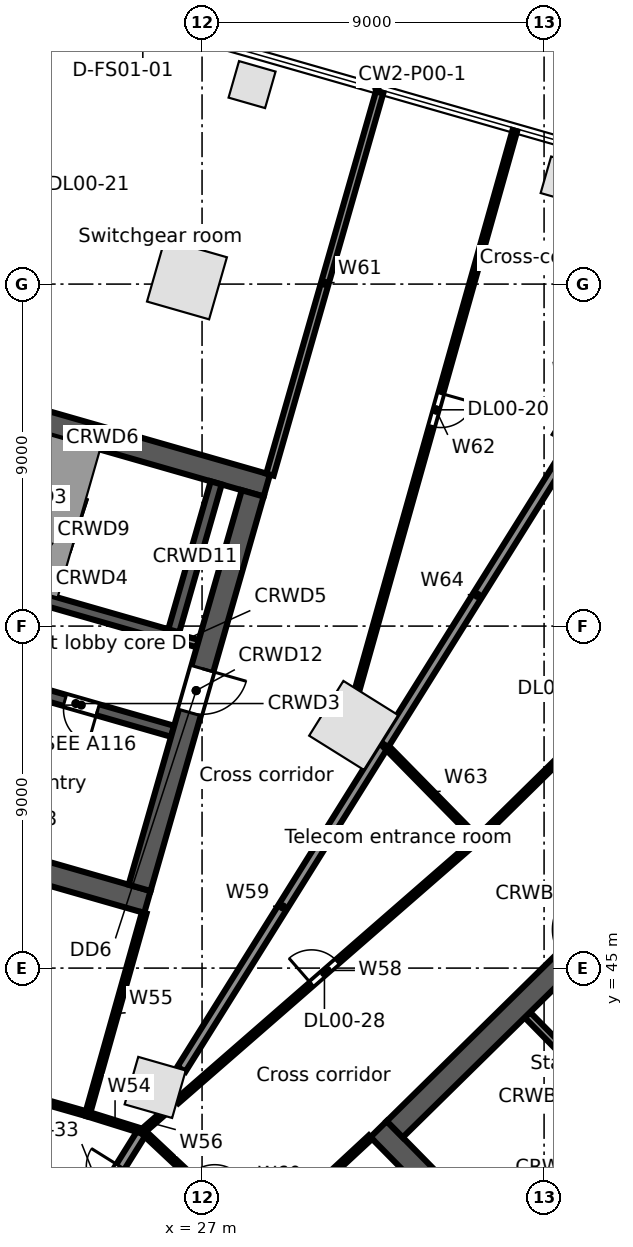
"""IFC4 building model, lengths in metres.
Left out: names, types, materials, properties, quantities, classifications, styles, units other than length and angle.
Written with IfcOpenShell. Run it as: python <this file> out.ifc"""

import sys

from ifc_helpers import new_model, si_unit, direction, frame, frame_2d, origin, origin_2d, place, context, subcontext, project, spatial, rectangle, extrude, element, fill, save


model = new_model("IFC4")
c1 = context("Model", 3, precision=1e-05, world=origin(), true_north=direction((0.0, 1.0)))
c2 = subcontext(c1, "Body", "Model", "MODEL_VIEW")
j1 = project(units=[si_unit("LENGTHUNIT", "METRE"), si_unit("PLANEANGLEUNIT", "RADIAN")], contexts=[c1])
p1 = place(None, origin())
s1 = spatial("IfcSite", under=j1, at=p1, CompositionType="ELEMENT")
p2 = place(p1, origin())
s2 = spatial("IfcBuilding", under=s1, at=p2, CompositionType="ELEMENT")
p3 = place(p2, origin())
s3 = spatial("IfcBuildingStorey", under=s2, at=p3, CompositionType="ELEMENT", Elevation=0.0)
p4 = place(p3, frame((37.085, 59.262, 0.0), z_axis=(0.0, 0.0, 1.0), x_axis=(-0.859406411501, 0.511293086077, 0.0)))
e1 = element("IfcColumn", 1, at=p4, inside=s3, PredefinedType="COLUMN", context=c2, shape_type="SweptSolid", body=[
    extrude(rectangle(XDim=1.3, YDim=1.3, at=origin_2d()), origin(), (0.0, 0.0, 1.0), 6.5),
])
p5 = place(p3, frame((26.603, 63.124, 0.0), z_axis=(0.0, 0.0, 1.0), x_axis=(-0.961261695938, 0.275637355817, 0.0)))
e2 = element("IfcColumn", 2, at=p5, inside=s3, PredefinedType="COLUMN", context=c2, shape_type="SweptSolid", body=[
    extrude(rectangle(XDim=1.7, YDim=1.7, at=origin_2d()), origin(), (0.0, 0.0, 1.0), 6.5),
])
p6 = place(p3, frame((25.767, 41.86, 0.0), z_axis=(0.0, 0.0, 1.0), x_axis=(0.961261695938, -0.275637355817, 0.0)))
e3 = element("IfcColumn", 3, at=p6, inside=s3, PredefinedType="COLUMN", context=c2, shape_type="SweptSolid", body=[
    extrude(rectangle(XDim=1.3, YDim=1.3, at=origin_2d()), origin(), (0.0, 0.0, 1.0), 6.5),
])
p7 = place(p3, frame((30.99, 51.386, 0.0), z_axis=(0.0, 0.0, 1.0), x_axis=(0.529919264233, 0.848048096156, 0.0)))
e4 = element("IfcColumn", 4, at=p7, inside=s3, PredefinedType="COLUMN", context=c2, shape_type="SweptSolid", body=[
    extrude(rectangle(XDim=1.7, YDim=1.7, at=origin_2d()), origin(), (0.0, 0.0, 1.0), 6.5),
])
for number, where, z_axis, x_axis in (
    (5, (36.528, 65.739, 0.0), (0.0, 0.0, 1.0), (-0.961, 0.276, 0.0)),
    (6, (28.316, 68.25, 0.0), (0.0, 0.0, 1.0), (-0.961, 0.276, 0.0)),
):
    element("IfcColumn", number, at=place(p3, frame(where, z_axis=z_axis, x_axis=x_axis)), inside=s3, PredefinedType="COLUMN", context=c2, shape_type="SweptSolid", body=[
        extrude(rectangle(XDim=1.0, YDim=1.0, at=origin_2d()), origin(), (0.0, 0.0, 1.0), 6.5),
    ])
p8 = place(p3, frame((31.646, 40.763, 0.0), z_axis=(0.0, 0.0, 1.0), x_axis=(0.700911255944, -0.713248491965, 0.0)))
e7 = element("IfcWall", 7, at=p8, inside=s3, PredefinedType="SOLIDWALL", context=c2, shape_type="SweptSolid", body=[
    extrude(rectangle(XDim=15.0, YDim=0.6, at=frame_2d((7.5, 0.0))), origin(), (0.0, 0.0, 1.0), 6.15),
])
p9 = place(p8, frame((12.9, 0.0, 0.0)))
e8 = element("IfcOpeningElement", 8, at=p9, cuts=e7, PredefinedType="OPENING", context=c2, shape_type="SweptSolid", body=[
    extrude(rectangle(XDim=1.2, YDim=2.1, at=frame_2d((0.6, 1.05))), frame((0.0, 0.31, 0.0), z_axis=(0.0, -1.0, 0.0), x_axis=(1.0, 0.0, 0.0)), (0.0, 0.0, 1.0), 0.62),
])
p10 = place(p3, frame((35.561, 43.769, 0.0), z_axis=(0.0, 0.0, 1.0), x_axis=(0.70090232736, -0.713257266, 0.0)))
e9 = element("IfcWall", 9, at=p10, inside=s3, PredefinedType="SOLIDWALL", context=c2, shape_type="SweptSolid", body=[
    extrude(rectangle(XDim=3.3, YDim=0.2, at=frame_2d((1.65, 0.0))), origin(), (0.0, 0.0, 1.0), 6.15),
])
p11 = place(p3, frame((32.07, 40.759, 0.0), z_axis=(0.0, 0.0, 1.0), x_axis=(0.713245344712, 0.70091445858, 0.0)))
e10 = element("IfcWall", 10, at=p11, inside=s3, PredefinedType="SOLIDWALL", context=c2, shape_type="SweptSolid", body=[
    extrude(rectangle(XDim=13.8, YDim=0.6, at=frame_2d((6.9, 0.0))), origin(), (0.0, 0.0, 1.0), 6.15),
])
p12 = place(p11, frame((6.3, 0.0, 0.0)))
e11 = element("IfcOpeningElement", 11, at=p12, cuts=e10, PredefinedType="OPENING", context=c2, shape_type="SweptSolid", body=[
    extrude(rectangle(XDim=1.2, YDim=2.1, at=frame_2d((0.6, 1.05))), frame((0.0, 0.31, 0.0), z_axis=(0.0, -1.0, 0.0), x_axis=(1.0, 0.0, 0.0)), (0.0, 0.0, 1.0), 0.62),
])
p13 = place(p3, frame((34.593, 38.191, 0.0), z_axis=(0.0, 0.0, 1.0), x_axis=(0.713252216116, 0.700907466222, 0.0)))
e12 = element("IfcWall", 12, at=p13, inside=s3, PredefinedType="SOLIDWALL", context=c2, shape_type="SweptSolid", body=[
    extrude(rectangle(XDim=4.45, YDim=0.2, at=frame_2d((2.225, 0.0))), origin(), (0.0, 0.0, 1.0), 6.15),
])
p14 = place(p3, frame((16.911, 49.221, 0.0), z_axis=(0.0, 0.0, 1.0), x_axis=(0.96126248289, -0.275634611374, 0.0)))
e13 = element("IfcWall", 13, at=p14, inside=s3, PredefinedType="SOLIDWALL", context=c2, shape_type="SweptSolid", body=[
    extrude(rectangle(XDim=9.0, YDim=0.6, at=frame_2d((4.5, 0.0))), origin(), (0.0, 0.0, 1.0), 6.15),
])
p15 = place(p3, frame((21.131, 52.692, 0.0), z_axis=(0.0, 0.0, 1.0), x_axis=(0.961271492568, -0.275603188616, 0.0)))
e14 = element("IfcWall", 14, at=p15, inside=s3, PredefinedType="SOLIDWALL", context=c2, shape_type="SweptSolid", body=[
    extrude(rectangle(XDim=5.3, YDim=0.3, at=frame_2d((2.65, 0.0))), origin(), (0.0, 0.0, 1.0), 6.15),
])
p16 = place(p15, frame((2.35, 0.0, 0.0)))
e15 = element("IfcOpeningElement", 15, at=p16, cuts=e14, PredefinedType="OPENING", context=c2, shape_type="SweptSolid", body=[
    extrude(rectangle(XDim=0.9, YDim=2.1, at=frame_2d((0.45, 1.05))), frame((0.0, 0.16, 0.0), z_axis=(0.0, -1.0, 0.0), x_axis=(1.0, 0.0, 0.0)), (0.0, 0.0, 1.0), 0.32),
])
p17 = place(p3, frame((19.389, 55.689, 0.0), z_axis=(0.0, 0.0, 1.0), x_axis=(0.961261397636, -0.275638396117, 0.0)))
e16 = element("IfcWall", 16, at=p17, inside=s3, PredefinedType="SOLIDWALL", context=c2, shape_type="SweptSolid", body=[
    extrude(rectangle(XDim=7.1, YDim=0.3, at=frame_2d((3.55, 0.0))), origin(), (0.0, 0.0, 1.0), 6.15),
])
p18 = place(p17, frame((0.2, 0.0, 0.0)))
e17 = element("IfcOpeningElement", 17, at=p18, cuts=e16, PredefinedType="OPENING", context=c2, shape_type="SweptSolid", body=[
    extrude(rectangle(XDim=1.0, YDim=2.1, at=frame_2d((0.5, 1.05))), frame((0.0, 0.16, 0.0), z_axis=(0.0, -1.0, 0.0), x_axis=(1.0, 0.0, 0.0)), (0.0, 0.0, 1.0), 0.32),
])
p19 = place(p3, frame((26.214, 53.732, 0.0), z_axis=(0.0, 0.0, 1.0), x_axis=(0.96122076476, -0.27578005982, 0.0)))
e18 = element("IfcWall", 18, at=p19, inside=s3, PredefinedType="SOLIDWALL", context=c2, shape_type="SweptSolid", body=[
    extrude(rectangle(XDim=0.7, YDim=0.2, at=frame_2d((0.35, 0.0))), origin(), (0.0, 0.0, 1.0), 6.15),
])
p20 = place(p3, frame((20.053, 60.18, 0.0), z_axis=(0.0, 0.0, 1.0), x_axis=(0.96126248289, -0.275634611374, 0.0)))
e19 = element("IfcWall", 19, at=p20, inside=s3, PredefinedType="SOLIDWALL", context=c2, shape_type="SweptSolid", body=[
    extrude(rectangle(XDim=9.0, YDim=0.6, at=frame_2d((4.5, 0.0))), origin(), (0.0, 0.0, 1.0), 6.15),
])
p21 = place(p3, frame((26.256, 53.876, 0.0), z_axis=(0.0, 0.0, 1.0), x_axis=(0.275612739511, 0.961268754209, 0.0)))
e20 = element("IfcWall", 20, at=p21, inside=s3, PredefinedType="SOLIDWALL", context=c2, shape_type="SweptSolid", body=[
    extrude(rectangle(XDim=4.05, YDim=0.3, at=frame_2d((2.025, 0.0))), origin(), (0.0, 0.0, 1.0), 6.15),
])
p22 = place(p3, frame((25.356, 47.112, 0.0), z_axis=(0.0, 0.0, 1.0), x_axis=(0.275631631629, 0.961263337304, 0.0)))
e21 = element("IfcWall", 21, at=p22, inside=s3, PredefinedType="SOLIDWALL", context=c2, shape_type="SweptSolid", body=[
    extrude(rectangle(XDim=10.8, YDim=0.6, at=frame_2d((5.4, 0.0))), origin(), (0.0, 0.0, 1.0), 6.15),
])
p23 = place(p22, frame((4.8, 0.0, 0.0)))
e22 = element("IfcOpeningElement", 22, at=p23, cuts=e21, PredefinedType="OPENING", context=c2, shape_type="SweptSolid", body=[
    extrude(rectangle(XDim=1.2, YDim=2.1, at=frame_2d((0.6, 1.05))), frame((0.0, 0.31, 0.0), z_axis=(0.0, -1.0, 0.0), x_axis=(1.0, 0.0, 0.0)), (0.0, 0.0, 1.0), 0.62),
])
p24 = place(p3, frame((15.335, 43.639, 0.0), z_axis=(0.0, 0.0, 1.0), x_axis=(0.961281982754, -0.275566597455, 0.0)))
e23 = element("IfcWall", 23, at=p24, inside=s3, PredefinedType="PARTITIONING", context=c2, shape_type="SweptSolid", body=[
    extrude(rectangle(XDim=9.0, YDim=0.125, at=frame_2d((4.5, 0.0))), origin(), (0.0, 0.0, 1.0), 5.322),
])
p25 = place(p24, frame((3.95, 0.0, 0.0)))
e24 = element("IfcOpeningElement", 24, at=p25, cuts=e23, PredefinedType="OPENING", context=c2, shape_type="SweptSolid", body=[
    extrude(rectangle(XDim=0.9, YDim=2.1, at=frame_2d((0.45, 1.05))), frame((0.0, 0.073, 0.0), z_axis=(0.0, -1.0, 0.0), x_axis=(1.0, 0.0, 0.0)), (0.0, 0.0, 1.0), 0.145),
])
p26 = place(p3, frame((20.136, 60.468, 0.0), z_axis=(0.0, 0.0, 1.0), x_axis=(0.275610651454, 0.96126935289, 0.0)))
e25 = element("IfcWall", 25, at=p26, inside=s3, PredefinedType="PARTITIONING", context=c2, shape_type="SweptSolid", body=[
    extrude(rectangle(XDim=10.475, YDim=0.2, at=frame_2d((5.237, 0.0))), origin(), (0.0, 0.0, 1.0), 5.43),
])
p27 = place(p26, frame((4.45, 0.0, 0.0)))
e26 = element("IfcOpeningElement", 26, at=p27, cuts=e25, PredefinedType="OPENING", context=c2, shape_type="SweptSolid", body=[
    extrude(rectangle(XDim=1.8, YDim=2.1, at=frame_2d((0.9, 1.05))), frame((0.0, 0.11, 0.0), z_axis=(0.0, -1.0, 0.0), x_axis=(1.0, 0.0, 0.0)), (0.0, 0.0, 1.0), 0.22),
])
p28 = place(p3, frame((23.397, 37.442, 0.0), z_axis=(0.0, 0.0, 1.0), x_axis=(0.529805058875, 0.848119448893, 0.0)))
e27 = element("IfcWall", 27, at=p28, inside=s3, PredefinedType="PARTITIONING", context=c2, shape_type="SweptSolid", body=[
    extrude(rectangle(XDim=3.849, YDim=0.25, at=frame_2d((1.924, 0.0))), origin(), (0.0, 0.0, 1.0), 5.212),
])
p29 = place(p28, frame((0.95, 0.0, 0.0)))
e28 = element("IfcOpeningElement", 28, at=p29, cuts=e27, PredefinedType="OPENING", context=c2, shape_type="SweptSolid", body=[
    extrude(rectangle(XDim=1.8, YDim=2.1, at=frame_2d((0.9, 1.05))), frame((0.0, 0.135, 0.0), z_axis=(0.0, -1.0, 0.0), x_axis=(1.0, 0.0, 0.0)), (0.0, 0.0, 1.0), 0.27),
])
p30 = place(p3, frame((23.986, 41.159, 0.0), z_axis=(0.0, 0.0, 1.0), x_axis=(0.954522865266, -0.298137719325, 0.0)))
e29 = element("IfcWall", 29, at=p30, inside=s3, PredefinedType="PARTITIONING", context=c2, shape_type="SweptSolid", body=[
    extrude(rectangle(XDim=1.519, YDim=0.125, at=frame_2d((0.76, 0.0))), origin(), (0.0, 0.0, 1.0), 5.212),
])
p31 = place(p3, frame((23.986, 41.159, 0.0), z_axis=(0.0, 0.0, 1.0), x_axis=(0.271465437068, 0.962448188983, 0.0)))
e30 = element("IfcWall", 30, at=p31, inside=s3, PredefinedType="PARTITIONING", context=c2, shape_type="SweptSolid", body=[
    extrude(rectangle(XDim=5.5, YDim=0.125, at=frame_2d((2.75, 0.0))), origin(), (0.0, 0.0, 1.0), 5.43),
])
p32 = place(p3, frame((25.436, 40.706, 0.0), z_axis=(0.0, 0.0, 1.0), x_axis=(0.753521944961, 0.657422754749, 0.0)))
e31 = element("IfcWall", 31, at=p32, inside=s3, PredefinedType="PARTITIONING", context=c2, shape_type="SweptSolid", body=[
    extrude(rectangle(XDim=0.656, YDim=0.125, at=frame_2d((0.328, 0.0))), origin(), (0.0, 0.0, 1.0), 6.15),
])
p33 = place(p3, frame((25.436, 40.706, 0.0), z_axis=(0.0, 0.0, 1.0), x_axis=(0.729011488135, -0.684501461041, 0.0)))
e32 = element("IfcWall", 32, at=p33, inside=s3, PredefinedType="PARTITIONING", context=c2, shape_type="SweptSolid", body=[
    extrude(rectangle(XDim=4.202, YDim=0.125, at=frame_2d((2.101, 0.0))), origin(), (0.0, 0.0, 1.0), 6.15),
])
p34 = place(p33, frame((1.7, 0.0, 0.0)))
e33 = element("IfcOpeningElement", 33, at=p34, cuts=e32, PredefinedType="OPENING", context=c2, shape_type="SweptSolid", body=[
    extrude(rectangle(XDim=0.9, YDim=2.1, at=frame_2d((0.45, 1.05))), frame((0.0, 0.073, 0.0), z_axis=(0.0, -1.0, 0.0), x_axis=(1.0, 0.0, 0.0)), (0.0, 0.0, 1.0), 0.145),
])
p35 = place(p3, frame((26.338, 41.492, 0.0), z_axis=(0.0, 0.0, 1.0), x_axis=(0.753866696092, 0.657027400131, 0.0)))
e34 = element("IfcWall", 34, at=p35, inside=s3, PredefinedType="PARTITIONING", context=c2, shape_type="SweptSolid", body=[
    extrude(rectangle(XDim=10.493, YDim=0.125, at=frame_2d((5.246, 0.0))), origin(), (0.0, 0.0, 1.0), 5.23),
])
p36 = place(p35, frame((4.7, 0.0, 0.0)))
e35 = element("IfcOpeningElement", 35, at=p36, cuts=e34, PredefinedType="OPENING", context=c2, shape_type="SweptSolid", body=[
    extrude(rectangle(XDim=0.9, YDim=2.1, at=frame_2d((0.45, 1.05))), frame((0.0, 0.073, 0.0), z_axis=(0.0, -1.0, 0.0), x_axis=(1.0, 0.0, 0.0)), (0.0, 0.0, 1.0), 0.145),
])
p37 = place(p3, frame((26.456, 42.338, 0.0), z_axis=(0.0, 0.0, 1.0), x_axis=(0.529866075757, 0.848081329686, 0.0)))
e36 = element("IfcWall", 36, at=p37, inside=s3, PredefinedType="PARTITIONING", context=c2, shape_type="SweptSolid", body=[
    extrude(rectangle(XDim=10.076, YDim=0.25, at=frame_2d((5.038, 0.0))), origin(), (0.0, 0.0, 1.0), 5.212),
])
p38 = place(p3, frame((28.499, 37.83, 0.0), z_axis=(0.0, 0.0, 1.0), x_axis=(0.732973836409, 0.680256830278, 0.0)))
e37 = element("IfcWall", 37, at=p38, inside=s3, PredefinedType="PARTITIONING", context=c2, shape_type="SweptSolid", body=[
    extrude(rectangle(XDim=4.001, YDim=0.125, at=frame_2d((2.0, 0.0))), origin(), (0.0, 0.0, 1.0), 5.43),
])
p39 = place(p3, frame((28.787, 57.987, 0.0), z_axis=(0.0, 0.0, 1.0), x_axis=(0.2756782675, 0.96124996376, 0.0)))
e38 = element("IfcWall", 38, at=p39, inside=s3, PredefinedType="PARTITIONING", context=c2, shape_type="SweptSolid", body=[
    extrude(rectangle(XDim=10.476, YDim=0.2, at=frame_2d((5.238, 0.0))), origin(), (0.0, 0.0, 1.0), 5.422),
])
p40 = place(p3, frame((31.084, 52.329, 0.0), z_axis=(0.0, 0.0, 1.0), x_axis=(0.271372887947, 0.962474288325, 0.0)))
e39 = element("IfcWall", 39, at=p40, inside=s3, PredefinedType="PARTITIONING", context=c2, shape_type="SweptSolid", body=[
    extrude(rectangle(XDim=15.281, YDim=0.125, at=frame_2d((7.641, 0.0))), origin(), (0.0, 0.0, 1.0), 5.422),
])
p41 = place(p40, frame((7.2, 0.0, 0.0)))
e40 = element("IfcOpeningElement", 40, at=p41, cuts=e39, PredefinedType="OPENING", context=c2, shape_type="SweptSolid", body=[
    extrude(rectangle(XDim=0.9, YDim=2.1, at=frame_2d((0.45, 1.05))), frame((0.0, 0.073, 0.0), z_axis=(0.0, -1.0, 0.0), x_axis=(1.0, 0.0, 0.0)), (0.0, 0.0, 1.0), 0.145),
])
p42 = place(p3, frame((31.795, 50.883, 0.0), z_axis=(0.0, 0.0, 1.0), x_axis=(0.700801832867, -0.713356005828, 0.0)))
e41 = element("IfcWall", 41, at=p42, inside=s3, PredefinedType="PARTITIONING", context=c2, shape_type="SweptSolid", body=[
    extrude(rectangle(XDim=3.5, YDim=0.125, at=frame_2d((1.75, 0.0))), origin(), (0.0, 0.0, 1.0), 5.23),
])
p43 = place(p3, frame((31.795, 50.883, 0.0), z_axis=(0.0, 0.0, 1.0), x_axis=(0.530015532415, 0.847987933522, 0.0)))
e42 = element("IfcWall", 42, at=p43, inside=s3, PredefinedType="PARTITIONING", context=c2, shape_type="SweptSolid", body=[
    extrude(rectangle(XDim=9.258, YDim=0.25, at=frame_2d((4.629, 0.0))), origin(), (0.0, 0.0, 1.0), 5.23),
])
p44 = place(p3, frame((34.248, 48.386, 0.0), z_axis=(0.0, 0.0, 1.0), x_axis=(0.713246685355, 0.700913094349, 0.0)))
e43 = element("IfcWall", 43, at=p44, inside=s3, PredefinedType="PARTITIONING", context=c2, shape_type="SweptSolid", body=[
    extrude(rectangle(XDim=11.501, YDim=0.125, at=frame_2d((5.75, 0.0))), origin(), (0.0, 0.0, 1.0), 5.33),
])
p45 = place(p44, frame((5.2, 0.0, 0.0)))
e44 = element("IfcOpeningElement", 44, at=p45, cuts=e43, PredefinedType="OPENING", context=c2, shape_type="SweptSolid", body=[
    extrude(rectangle(XDim=0.9, YDim=2.1, at=frame_2d((0.45, 1.05))), frame((0.0, 0.073, 0.0), z_axis=(0.0, -1.0, 0.0), x_axis=(1.0, 0.0, 0.0)), (0.0, 0.0, 1.0), 0.145),
])
p46 = place(p23, frame((1.2, 0.0, 0.0), z_axis=(0.0, 0.0, 1.0), x_axis=(-1.0, 0.0, 0.0)))
e45 = element("IfcDoor", 45, at=p46, inside=s3, OperationType="SINGLE_SWING_LEFT", PredefinedType="DOOR", context=c2, shape_type="SweptSolid", body=[
    extrude(rectangle(XDim=1.2, YDim=2.1, at=frame_2d((0.6, 1.05))), frame((0.0, 0.025, 0.0), z_axis=(0.0, -1.0, 0.0), x_axis=(1.0, 0.0, 0.0)), (0.0, 0.0, 1.0), 0.05),
])
fill(e22, e45)
p47 = place(p16, frame((0.9, 0.0, 0.0), z_axis=(0.0, 0.0, 1.0), x_axis=(-1.0, 0.0, 0.0)))
e46 = element("IfcDoor", 46, at=p47, inside=s3, OperationType="SINGLE_SWING_LEFT", PredefinedType="DOOR", context=c2, shape_type="SweptSolid", body=[
    extrude(rectangle(XDim=0.9, YDim=2.1, at=frame_2d((0.45, 1.05))), frame((0.0, 0.025, 0.0), z_axis=(0.0, -1.0, 0.0), x_axis=(1.0, 0.0, 0.0)), (0.0, 0.0, 1.0), 0.05),
])
fill(e15, e46)
p48 = place(p41, frame((0.9, 0.0, 0.0), z_axis=(0.0, 0.0, 1.0), x_axis=(-1.0, 0.0, 0.0)))
e47 = element("IfcDoor", 47, at=p48, inside=s3, OperationType="SINGLE_SWING_LEFT", PredefinedType="DOOR", context=c2, shape_type="SweptSolid", body=[
    extrude(rectangle(XDim=0.9, YDim=2.1, at=frame_2d((0.45, 1.05))), frame((0.0, 0.025, 0.0), z_axis=(0.0, -1.0, 0.0), x_axis=(1.0, 0.0, 0.0)), (0.0, 0.0, 1.0), 0.05),
])
fill(e40, e47)
p49 = place(p36, origin())
e48 = element("IfcDoor", 48, at=p49, inside=s3, OperationType="SINGLE_SWING_LEFT", PredefinedType="DOOR", context=c2, shape_type="SweptSolid", body=[
    extrude(rectangle(XDim=0.9, YDim=2.1, at=frame_2d((0.45, 1.05))), frame((0.0, 0.025, 0.0), z_axis=(0.0, -1.0, 0.0), x_axis=(1.0, 0.0, 0.0)), (0.0, 0.0, 1.0), 0.05),
])
fill(e35, e48)
p50 = place(p29, origin())
e49 = element("IfcDoor", 49, at=p50, inside=s3, OperationType="DOUBLE_DOOR_SINGLE_SWING", PredefinedType="DOOR", context=c2, shape_type="SweptSolid", body=[
    extrude(rectangle(XDim=1.8, YDim=2.1, at=frame_2d((0.9, 1.05))), frame((0.0, 0.025, 0.0), z_axis=(0.0, -1.0, 0.0), x_axis=(1.0, 0.0, 0.0)), (0.0, 0.0, 1.0), 0.05),
])
fill(e28, e49)
save(model, sys.argv[1])
